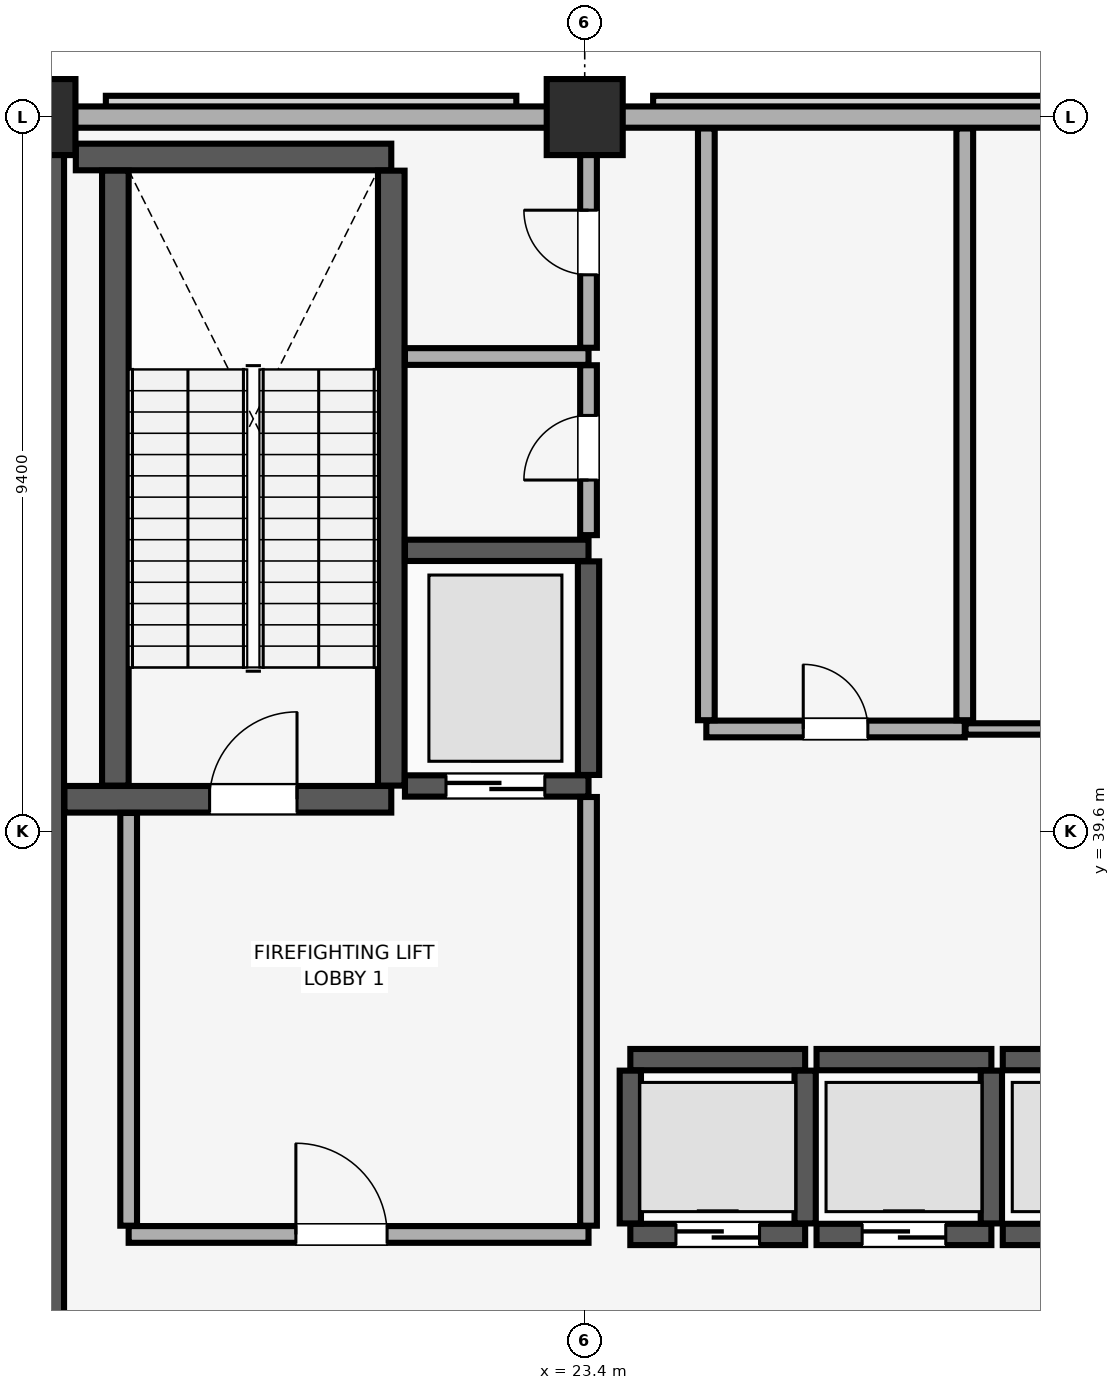
"""IFC4 building model, lengths in metres.
Left out: names, types, materials, properties, quantities, classifications, styles, units other than length and angle.
Written with IfcOpenShell. Run it as: python <this file> out.ifc"""

import sys

from ifc_helpers import new_model, si_unit, direction, frame, frame_2d, origin, origin_2d, place, context, subcontext, project, spatial, rectangle, extrude, element, fill, save


model = new_model("IFC4")
c1 = context("Model", 3, precision=1e-05, world=origin(), true_north=direction((0.0, 1.0)))
c2 = subcontext(c1, "Body", "Model", "MODEL_VIEW")
j1 = project(units=[si_unit("LENGTHUNIT", "METRE"), si_unit("PLANEANGLEUNIT", "RADIAN")], contexts=[c1])
p1 = place(None, origin())
s1 = spatial("IfcSite", under=j1, at=p1, CompositionType="ELEMENT")
p2 = place(p1, origin())
s2 = spatial("IfcBuilding", under=s1, at=p2, CompositionType="ELEMENT")
p3 = place(p2, frame((0.0, 0.0, 280.5)))
s3 = spatial("IfcBuildingStorey", under=s2, at=p3, CompositionType="ELEMENT", Elevation=280.5)
for number, where, z_axis, x_axis in (
    (1, (16.2, 49.0, 0.0), (0.0, 0.0, 1.0), (1.0, 0.0, 0.0)),
    (2, (23.4, 49.0, 0.0), (0.0, 0.0, 1.0), (1.0, 0.0, 0.0)),
):
    element("IfcColumn", number, at=place(p3, frame(where, z_axis=z_axis, x_axis=x_axis)), inside=s3, PredefinedType="COLUMN", context=c2, shape_type="SweptSolid", body=[
        extrude(rectangle(XDim=1.0, YDim=1.0, at=origin_2d()), origin(), (0.0, 0.0, 1.0), 5.1),
    ])
p4 = place(p3, frame((74.2, 49.0, 0.0), z_axis=(0.0, 0.0, 1.0), x_axis=(-1.0, 0.0, 0.0)))
e3 = element("IfcWall", 3, at=p4, inside=s3, PredefinedType="SOLIDWALL", context=c2, shape_type="SweptSolid", body=[
    extrude(rectangle(XDim=64.4, YDim=0.28, at=frame_2d((32.2, 0.0))), origin(), (0.0, 0.0, 1.0), 4.0),
])
p5 = place(p3, frame((16.2, 29.4, 0.0), z_axis=(0.0, 0.0, 1.0), x_axis=(0.0, 1.0, 0.0)))
e4 = element("IfcWall", 4, at=p5, inside=s3, PredefinedType="SHEAR", context=c2, shape_type="SweptSolid", body=[
    extrude(rectangle(XDim=19.2, YDim=0.7, at=frame_2d((9.6, 0.0))), origin(), (0.0, 0.0, 1.0), 5.1),
])
p6 = place(p3, frame((16.555, 40.025, 0.0), z_axis=(0.0, 0.0, 1.0), x_axis=(1.0, 0.0, 0.0)))
e5 = element("IfcWall", 5, at=p6, inside=s3, PredefinedType="SHEAR", context=c2, shape_type="SweptSolid", body=[
    extrude(rectangle(XDim=4.3, YDim=0.35, at=frame_2d((2.15, 0.0))), origin(), (0.0, 0.0, 1.0), 5.1),
])
p7 = place(p6, frame((1.91, 0.0, 0.0)))
e6 = element("IfcOpeningElement", 6, at=p7, cuts=e5, PredefinedType="OPENING", context=c2, shape_type="SweptSolid", body=[
    extrude(rectangle(XDim=1.15, YDim=2.15, at=frame_2d((0.575, 1.075))), frame((0.0, 0.185, 0.0), z_axis=(0.0, -1.0, 0.0), x_axis=(1.0, 0.0, 0.0)), (0.0, 0.0, 1.0), 0.37),
])
p8 = place(p3, frame((16.705, 48.475, 0.0), z_axis=(0.0, 0.0, 1.0), x_axis=(1.0, 0.0, 0.0)))
e7 = element("IfcWall", 7, at=p8, inside=s3, PredefinedType="SHEAR", context=c2, shape_type="SweptSolid", body=[
    extrude(rectangle(XDim=4.15, YDim=0.35, at=frame_2d((2.075, 0.0))), origin(), (0.0, 0.0, 1.0), 5.1),
])
for number, where, z_axis, x_axis in (
    (8, (17.225, 40.205, 0.0), (0.0, 0.0, 1.0), (0.0, 1.0, 0.0)),
    (9, (20.855, 40.205, 0.0), (0.0, 0.0, 1.0), (0.0, 1.0, 0.0)),
):
    element("IfcWall", number, at=place(p3, frame(where, z_axis=z_axis, x_axis=x_axis)), inside=s3, PredefinedType="SHEAR", context=c2, shape_type="SweptSolid", body=[
        extrude(rectangle(XDim=8.09, YDim=0.35, at=frame_2d((4.045, 0.0))), origin(), (0.0, 0.0, 1.0), 5.1),
    ])
p9 = place(p3, frame((24.0, 34.3, 0.0), z_axis=(0.0, 0.0, 1.0), x_axis=(1.0, 0.0, 0.0)))
e10 = element("IfcWall", 10, at=p9, inside=s3, PredefinedType="SHEAR", context=c2, shape_type="SweptSolid", body=[
    extrude(rectangle(XDim=2.3, YDim=0.28, at=frame_2d((1.15, 0.0))), origin(), (0.0, 0.0, 1.0), 5.1),
])
p10 = place(p9, frame((0.6, 0.0, 0.0)))
e11 = element("IfcOpeningElement", 11, at=p10, cuts=e10, PredefinedType="OPENING", context=c2, shape_type="SweptSolid", body=[
    extrude(rectangle(XDim=1.1, YDim=2.2, at=frame_2d((0.55, 1.1))), frame((0.0, 0.15, 0.0), z_axis=(0.0, -1.0, 0.0), x_axis=(1.0, 0.0, 0.0)), (0.0, 0.0, 1.0), 0.3),
])
p11 = place(p3, frame((24.0, 36.6, 0.0), z_axis=(0.0, 0.0, 1.0), x_axis=(1.0, 0.0, 0.0)))
e12 = element("IfcWall", 12, at=p11, inside=s3, PredefinedType="SHEAR", context=c2, shape_type="SweptSolid", body=[
    extrude(rectangle(XDim=2.3, YDim=0.28, at=frame_2d((1.15, 0.0))), origin(), (0.0, 0.0, 1.0), 5.1),
])
for number, where, z_axis, x_axis in (
    (13, (24.0, 34.445, 0.0), (0.0, 0.0, 1.0), (0.0, 1.0, 0.0)),
    (14, (26.3, 34.445, 0.0), (0.0, 0.0, 1.0), (0.0, 1.0, 0.0)),
):
    element("IfcWall", number, at=place(p3, frame(where, z_axis=z_axis, x_axis=x_axis)), inside=s3, PredefinedType="SHEAR", context=c2, shape_type="SweptSolid", body=[
        extrude(rectangle(XDim=2.01, YDim=0.28, at=frame_2d((1.005, 0.0))), origin(), (0.0, 0.0, 1.0), 5.1),
    ])
p12 = place(p3, frame((26.45, 34.3, 0.0), z_axis=(0.0, 0.0, 1.0), x_axis=(1.0, 0.0, 0.0)))
e15 = element("IfcWall", 15, at=p12, inside=s3, PredefinedType="SHEAR", context=c2, shape_type="SweptSolid", body=[
    extrude(rectangle(XDim=2.3, YDim=0.28, at=frame_2d((1.15, 0.0))), origin(), (0.0, 0.0, 1.0), 5.1),
])
p13 = place(p12, frame((0.6, 0.0, 0.0)))
e16 = element("IfcOpeningElement", 16, at=p13, cuts=e15, PredefinedType="OPENING", context=c2, shape_type="SweptSolid", body=[
    extrude(rectangle(XDim=1.1, YDim=2.2, at=frame_2d((0.55, 1.1))), frame((0.0, 0.15, 0.0), z_axis=(0.0, -1.0, 0.0), x_axis=(1.0, 0.0, 0.0)), (0.0, 0.0, 1.0), 0.3),
])
p14 = place(p3, frame((26.45, 36.6, 0.0), z_axis=(0.0, 0.0, 1.0), x_axis=(1.0, 0.0, 0.0)))
e17 = element("IfcWall", 17, at=p14, inside=s3, PredefinedType="SHEAR", context=c2, shape_type="SweptSolid", body=[
    extrude(rectangle(XDim=2.3, YDim=0.28, at=frame_2d((1.15, 0.0))), origin(), (0.0, 0.0, 1.0), 5.1),
])
p15 = place(p3, frame((28.75, 34.445, 0.0), z_axis=(0.0, 0.0, 1.0), x_axis=(0.0, 1.0, 0.0)))
e18 = element("IfcWall", 18, at=p15, inside=s3, PredefinedType="SHEAR", context=c2, shape_type="SweptSolid", body=[
    extrude(rectangle(XDim=2.01, YDim=0.28, at=frame_2d((1.005, 0.0))), origin(), (0.0, 0.0, 1.0), 5.1),
])
p16 = place(p3, frame((28.9, 34.3, 0.0), z_axis=(0.0, 0.0, 1.0), x_axis=(1.0, 0.0, 0.0)))
e19 = element("IfcWall", 19, at=p16, inside=s3, PredefinedType="SHEAR", context=c2, shape_type="SweptSolid", body=[
    extrude(rectangle(XDim=2.3, YDim=0.28, at=frame_2d((1.15, 0.0))), origin(), (0.0, 0.0, 1.0), 5.1),
])
p17 = place(p16, frame((0.6, 0.0, 0.0)))
e20 = element("IfcOpeningElement", 20, at=p17, cuts=e19, PredefinedType="OPENING", context=c2, shape_type="SweptSolid", body=[
    extrude(rectangle(XDim=1.1, YDim=2.2, at=frame_2d((0.55, 1.1))), frame((0.0, 0.15, 0.0), z_axis=(0.0, -1.0, 0.0), x_axis=(1.0, 0.0, 0.0)), (0.0, 0.0, 1.0), 0.3),
])
p18 = place(p3, frame((28.9, 36.6, 0.0), z_axis=(0.0, 0.0, 1.0), x_axis=(1.0, 0.0, 0.0)))
e21 = element("IfcWall", 21, at=p18, inside=s3, PredefinedType="SHEAR", context=c2, shape_type="SweptSolid", body=[
    extrude(rectangle(XDim=2.3, YDim=0.28, at=frame_2d((1.15, 0.0))), origin(), (0.0, 0.0, 1.0), 5.1),
])
p19 = place(p3, frame((21.035, 40.2, 0.0), z_axis=(0.0, 0.0, 1.0), x_axis=(1.0, 0.0, 0.0)))
e22 = element("IfcWall", 22, at=p19, inside=s3, PredefinedType="SHEAR", context=c2, shape_type="SweptSolid", body=[
    extrude(rectangle(XDim=2.415, YDim=0.28, at=frame_2d((1.208, 0.0))), origin(), (0.0, 0.0, 1.0), 5.1),
])
p20 = place(p19, frame((0.54, 0.0, 0.0)))
e23 = element("IfcOpeningElement", 23, at=p20, cuts=e22, PredefinedType="OPENING", context=c2, shape_type="SweptSolid", body=[
    extrude(rectangle(XDim=1.3, YDim=2.3, at=frame_2d((0.65, 1.15))), frame((0.0, 0.15, 0.0), z_axis=(0.0, -1.0, 0.0), x_axis=(1.0, 0.0, 0.0)), (0.0, 0.0, 1.0), 0.3),
])
p21 = place(p3, frame((21.035, 43.3, 0.0), z_axis=(0.0, 0.0, 1.0), x_axis=(1.0, 0.0, 0.0)))
e24 = element("IfcWall", 24, at=p21, inside=s3, PredefinedType="SHEAR", context=c2, shape_type="SweptSolid", body=[
    extrude(rectangle(XDim=2.415, YDim=0.28, at=frame_2d((1.208, 0.0))), origin(), (0.0, 0.0, 1.0), 5.1),
])
p22 = place(p3, frame((23.45, 40.345, 0.0), z_axis=(0.0, 0.0, 1.0), x_axis=(0.0, 1.0, 0.0)))
e25 = element("IfcWall", 25, at=p22, inside=s3, PredefinedType="SHEAR", context=c2, shape_type="SweptSolid", body=[
    extrude(rectangle(XDim=2.81, YDim=0.28, at=frame_2d((1.405, 0.0))), origin(), (0.0, 0.0, 1.0), 5.1),
])
p23 = place(p3, frame((17.4, 34.3, 0.0), z_axis=(0.0, 0.0, 1.0), x_axis=(1.0, 0.0, 0.0)))
e26 = element("IfcWall", 26, at=p23, inside=s3, PredefinedType="PARTITIONING", context=c2, shape_type="SweptSolid", body=[
    extrude(rectangle(XDim=6.05, YDim=0.22, at=frame_2d((3.025, 0.0))), origin(), (0.0, 0.0, 1.0), 5.1),
])
p24 = place(p23, frame((2.2, 0.0, 0.0)))
e27 = element("IfcOpeningElement", 27, at=p24, cuts=e26, PredefinedType="OPENING", context=c2, shape_type="SweptSolid", body=[
    extrude(rectangle(XDim=1.2, YDim=2.15, at=frame_2d((0.6, 1.075))), frame((0.0, 0.12, 0.0), z_axis=(0.0, -1.0, 0.0), x_axis=(1.0, 0.0, 0.0)), (0.0, 0.0, 1.0), 0.24),
])
p25 = place(p3, frame((17.4, 34.415, 0.0), z_axis=(0.0, 0.0, 1.0), x_axis=(0.0, 1.0, 0.0)))
e28 = element("IfcWall", 28, at=p25, inside=s3, PredefinedType="PARTITIONING", context=c2, shape_type="SweptSolid", body=[
    extrude(rectangle(XDim=5.43, YDim=0.22, at=frame_2d((2.715, 0.0))), origin(), (0.0, 0.0, 1.0), 5.1),
])
p26 = place(p3, frame((23.45, 34.415, 0.0), z_axis=(0.0, 0.0, 1.0), x_axis=(0.0, 1.0, 0.0)))
e29 = element("IfcWall", 29, at=p26, inside=s3, PredefinedType="PARTITIONING", context=c2, shape_type="SweptSolid", body=[
    extrude(rectangle(XDim=5.64, YDim=0.22, at=frame_2d((2.82, 0.0))), origin(), (0.0, 0.0, 1.0), 5.1),
])
p27 = place(p3, frame((21.035, 45.85, 0.0), z_axis=(0.0, 0.0, 1.0), x_axis=(1.0, 0.0, 0.0)))
e30 = element("IfcWall", 30, at=p27, inside=s3, PredefinedType="PARTITIONING", context=c2, shape_type="SweptSolid", body=[
    extrude(rectangle(XDim=2.415, YDim=0.22, at=frame_2d((1.208, 0.0))), origin(), (0.0, 0.0, 1.0), 5.1),
])
p28 = place(p3, frame((23.45, 43.5, 0.0), z_axis=(0.0, 0.0, 1.0), x_axis=(0.0, 1.0, 0.0)))
e31 = element("IfcWall", 31, at=p28, inside=s3, PredefinedType="PARTITIONING", context=c2, shape_type="SweptSolid", body=[
    extrude(rectangle(XDim=2.235, YDim=0.22, at=frame_2d((1.118, 0.0))), origin(), (0.0, 0.0, 1.0), 5.1),
])
p29 = place(p28, frame((0.725, 0.0, 0.0)))
e32 = element("IfcOpeningElement", 32, at=p29, cuts=e31, PredefinedType="OPENING", context=c2, shape_type="SweptSolid", body=[
    extrude(rectangle(XDim=0.85, YDim=2.1, at=frame_2d((0.425, 1.05))), frame((0.0, 0.12, 0.0), z_axis=(0.0, -1.0, 0.0), x_axis=(1.0, 0.0, 0.0)), (0.0, 0.0, 1.0), 0.24),
])
p30 = place(p3, frame((23.45, 45.965, 0.0), z_axis=(0.0, 0.0, 1.0), x_axis=(0.0, 1.0, 0.0)))
e33 = element("IfcWall", 33, at=p30, inside=s3, PredefinedType="PARTITIONING", context=c2, shape_type="SweptSolid", body=[
    extrude(rectangle(XDim=2.885, YDim=0.22, at=frame_2d((1.442, 0.0))), origin(), (0.0, 0.0, 1.0), 5.1),
])
p31 = place(p30, frame((0.96, 0.0, 0.0)))
e34 = element("IfcOpeningElement", 34, at=p31, cuts=e33, PredefinedType="OPENING", context=c2, shape_type="SweptSolid", body=[
    extrude(rectangle(XDim=0.85, YDim=2.1, at=frame_2d((0.425, 1.05))), frame((0.0, 0.12, 0.0), z_axis=(0.0, -1.0, 0.0), x_axis=(1.0, 0.0, 0.0)), (0.0, 0.0, 1.0), 0.24),
])
p32 = place(p3, frame((25.0, 40.95, 0.0), z_axis=(0.0, 0.0, 1.0), x_axis=(1.0, 0.0, 0.0)))
e35 = element("IfcWall", 35, at=p32, inside=s3, PredefinedType="PARTITIONING", context=c2, shape_type="SweptSolid", body=[
    extrude(rectangle(XDim=3.4, YDim=0.22, at=frame_2d((1.7, 0.0))), origin(), (0.0, 0.0, 1.0), 5.1),
])
p33 = place(p32, frame((1.275, 0.0, 0.0)))
e36 = element("IfcOpeningElement", 36, at=p33, cuts=e35, PredefinedType="OPENING", context=c2, shape_type="SweptSolid", body=[
    extrude(rectangle(XDim=0.85, YDim=2.1, at=frame_2d((0.425, 1.05))), frame((0.0, 0.12, 0.0), z_axis=(0.0, -1.0, 0.0), x_axis=(1.0, 0.0, 0.0)), (0.0, 0.0, 1.0), 0.24),
])
for number, where, z_axis, x_axis in (
    (37, (25.0, 41.065, 0.0), (0.0, 0.0, 1.0), (0.0, 1.0, 0.0)),
    (38, (28.4, 41.065, 0.0), (0.0, 0.0, 1.0), (0.0, 1.0, 0.0)),
):
    element("IfcWall", number, at=place(p3, frame(where, z_axis=z_axis, x_axis=x_axis)), inside=s3, PredefinedType="PARTITIONING", context=c2, shape_type="SweptSolid", body=[
        extrude(rectangle(XDim=7.785, YDim=0.22, at=frame_2d((3.893, 0.0))), origin(), (0.0, 0.0, 1.0), 5.1),
    ])
p34 = place(p3, frame((28.41, 40.95, 0.0), z_axis=(0.0, 0.0, 1.0), x_axis=(1.0, 0.0, 0.0)))
e39 = element("IfcWall", 39, at=p34, inside=s3, PredefinedType="PARTITIONING", context=c2, shape_type="SweptSolid", body=[
    extrude(rectangle(XDim=7.69, YDim=0.15, at=frame_2d((3.845, 0.0))), origin(), (0.0, 0.0, 1.0), 5.1),
])
p35 = place(p34, frame((3.415, 0.0, 0.0)))
e40 = element("IfcOpeningElement", 40, at=p35, cuts=e39, PredefinedType="OPENING", context=c2, shape_type="SweptSolid", body=[
    extrude(rectangle(XDim=0.85, YDim=2.1, at=frame_2d((0.425, 1.05))), frame((0.0, 0.085, 0.0), z_axis=(0.0, -1.0, 0.0), x_axis=(1.0, 0.0, 0.0)), (0.0, 0.0, 1.0), 0.17),
])
p36 = place(p7, origin())
e41 = element("IfcDoor", 41, at=p36, inside=s3, OperationType="SINGLE_SWING_RIGHT", PredefinedType="DOOR", context=c2, shape_type="SweptSolid", body=[
    extrude(rectangle(XDim=1.15, YDim=2.15, at=frame_2d((0.575, 1.075))), frame((0.0, 0.025, 0.0), z_axis=(0.0, -1.0, 0.0), x_axis=(1.0, 0.0, 0.0)), (0.0, 0.0, 1.0), 0.05),
])
fill(e6, e41)
p37 = place(p10, origin())
e42 = element("IfcDoor", 42, at=p37, inside=s3, OperationType="DOUBLE_DOOR_SLIDING", PredefinedType="DOOR", context=c2, shape_type="SweptSolid", body=[
    extrude(rectangle(XDim=1.1, YDim=2.2, at=frame_2d((0.55, 1.1))), frame((0.0, 0.025, 0.0), z_axis=(0.0, -1.0, 0.0), x_axis=(1.0, 0.0, 0.0)), (0.0, 0.0, 1.0), 0.05),
])
fill(e11, e42)
p38 = place(p13, origin())
e43 = element("IfcDoor", 43, at=p38, inside=s3, OperationType="DOUBLE_DOOR_SLIDING", PredefinedType="DOOR", context=c2, shape_type="SweptSolid", body=[
    extrude(rectangle(XDim=1.1, YDim=2.2, at=frame_2d((0.55, 1.1))), frame((0.0, 0.025, 0.0), z_axis=(0.0, -1.0, 0.0), x_axis=(1.0, 0.0, 0.0)), (0.0, 0.0, 1.0), 0.05),
])
fill(e16, e43)
p39 = place(p20, origin())
e44 = element("IfcDoor", 44, at=p39, inside=s3, OperationType="DOUBLE_DOOR_SLIDING", PredefinedType="DOOR", context=c2, shape_type="SweptSolid", body=[
    extrude(rectangle(XDim=1.3, YDim=2.3, at=frame_2d((0.65, 1.15))), frame((0.0, 0.025, 0.0), z_axis=(0.0, -1.0, 0.0), x_axis=(1.0, 0.0, 0.0)), (0.0, 0.0, 1.0), 0.05),
])
fill(e23, e44)
p40 = place(p24, origin())
e45 = element("IfcDoor", 45, at=p40, inside=s3, OperationType="SINGLE_SWING_LEFT", PredefinedType="DOOR", context=c2, shape_type="SweptSolid", body=[
    extrude(rectangle(XDim=1.2, YDim=2.15, at=frame_2d((0.6, 1.075))), frame((0.0, 0.025, 0.0), z_axis=(0.0, -1.0, 0.0), x_axis=(1.0, 0.0, 0.0)), (0.0, 0.0, 1.0), 0.05),
])
fill(e27, e45)
p41 = place(p29, origin())
e46 = element("IfcDoor", 46, at=p41, inside=s3, OperationType="SINGLE_SWING_LEFT", PredefinedType="DOOR", context=c2, shape_type="SweptSolid", body=[
    extrude(rectangle(XDim=0.85, YDim=2.1, at=frame_2d((0.425, 1.05))), frame((0.0, 0.025, 0.0), z_axis=(0.0, -1.0, 0.0), x_axis=(1.0, 0.0, 0.0)), (0.0, 0.0, 1.0), 0.05),
])
fill(e32, e46)
p42 = place(p31, origin())
e47 = element("IfcDoor", 47, at=p42, inside=s3, OperationType="SINGLE_SWING_RIGHT", PredefinedType="DOOR", context=c2, shape_type="SweptSolid", body=[
    extrude(rectangle(XDim=0.85, YDim=2.1, at=frame_2d((0.425, 1.05))), frame((0.0, 0.025, 0.0), z_axis=(0.0, -1.0, 0.0), x_axis=(1.0, 0.0, 0.0)), (0.0, 0.0, 1.0), 0.05),
])
fill(e34, e47)
p43 = place(p33, origin())
e48 = element("IfcDoor", 48, at=p43, inside=s3, OperationType="SINGLE_SWING_LEFT", PredefinedType="DOOR", context=c2, shape_type="SweptSolid", body=[
    extrude(rectangle(XDim=0.85, YDim=2.1, at=frame_2d((0.425, 1.05))), frame((0.0, 0.025, 0.0), z_axis=(0.0, -1.0, 0.0), x_axis=(1.0, 0.0, 0.0)), (0.0, 0.0, 1.0), 0.05),
])
fill(e36, e48)
save(model, sys.argv[1])
